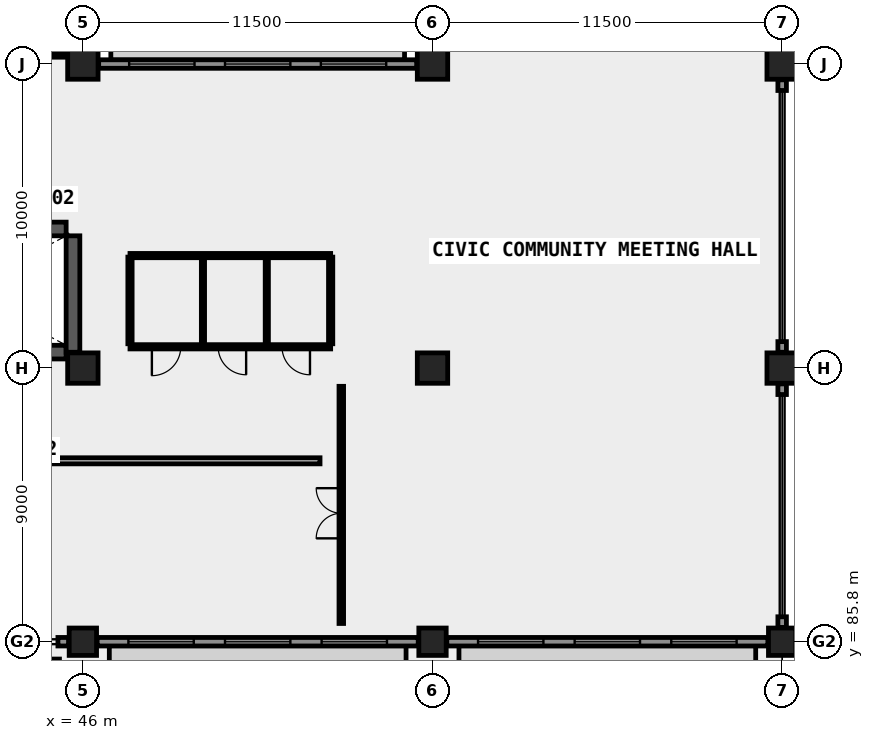
"""IFC4 building model, lengths in metres.
Left out: names, types, materials, properties, quantities, classifications, styles, units other than length and angle.
Written with IfcOpenShell. Run it as: python <this file> out.ifc"""

import sys

from ifc_helpers import new_model, si_unit, direction, frame, frame_2d, origin, origin_2d, place, context, subcontext, project, spatial, rectangle, extrude, element, fill, save


model = new_model("IFC4")
c1 = context("Model", 3, precision=1e-05, world=origin(), true_north=direction((0.0, 1.0)))
c2 = subcontext(c1, "Body", "Model", "MODEL_VIEW")
j1 = project(units=[si_unit("LENGTHUNIT", "METRE"), si_unit("PLANEANGLEUNIT", "RADIAN")], contexts=[c1])
p1 = place(None, origin())
s1 = spatial("IfcSite", under=j1, at=p1, CompositionType="ELEMENT")
p2 = place(p1, origin())
s2 = spatial("IfcBuilding", under=s1, at=p2, CompositionType="ELEMENT")
p3 = place(p2, frame((0.0, 0.0, 8.4)))
s3 = spatial("IfcBuildingStorey", under=s2, at=p3, CompositionType="ELEMENT", Elevation=8.4)
p4 = place(p3, frame((46.0, 85.8, 0.0), z_axis=(0.0, 0.0, 1.0), x_axis=(1.0, 0.0, 0.0)))
e1 = element("IfcColumn", 1, at=p4, inside=s3, PredefinedType="COLUMN", context=c2, shape_type="SweptSolid", body=[
    extrude(rectangle(XDim=0.9, YDim=0.9, at=origin_2d()), origin(), (0.0, 0.0, 1.0), 5.4),
])
for number, where, z_axis, x_axis in (
    (2, (46.0, 94.8, 0.0), (0.0, 0.0, 1.0), (1.0, 0.0, 0.0)),
    (3, (46.0, 104.8, 0.0), (0.0, 0.0, 1.0), (1.0, 0.0, 0.0)),
):
    element("IfcColumn", number, at=place(p3, frame(where, z_axis=z_axis, x_axis=x_axis)), inside=s3, PredefinedType="COLUMN", context=c2, shape_type="SweptSolid", body=[
        extrude(rectangle(XDim=1.0, YDim=1.0, at=origin_2d()), origin(), (0.0, 0.0, 1.0), 5.4),
    ])
p5 = place(p3, frame((57.5, 85.8, 0.0), z_axis=(0.0, 0.0, 1.0), x_axis=(1.0, 0.0, 0.0)))
e4 = element("IfcColumn", 4, at=p5, inside=s3, PredefinedType="COLUMN", context=c2, shape_type="SweptSolid", body=[
    extrude(rectangle(XDim=0.9, YDim=0.9, at=origin_2d()), origin(), (0.0, 0.0, 1.0), 5.4),
])
for number, where, z_axis, x_axis in (
    (5, (57.5, 94.8, 0.0), (0.0, 0.0, 1.0), (1.0, 0.0, 0.0)),
    (6, (57.5, 104.8, 0.0), (0.0, 0.0, 1.0), (1.0, 0.0, 0.0)),
):
    element("IfcColumn", number, at=place(p3, frame(where, z_axis=z_axis, x_axis=x_axis)), inside=s3, PredefinedType="COLUMN", context=c2, shape_type="SweptSolid", body=[
        extrude(rectangle(XDim=1.0, YDim=1.0, at=origin_2d()), origin(), (0.0, 0.0, 1.0), 5.4),
    ])
p6 = place(p3, frame((69.0, 85.8, 0.0), z_axis=(0.0, 0.0, 1.0), x_axis=(1.0, 0.0, 0.0)))
e7 = element("IfcColumn", 7, at=p6, inside=s3, PredefinedType="COLUMN", context=c2, shape_type="SweptSolid", body=[
    extrude(rectangle(XDim=0.9, YDim=0.9, at=origin_2d()), origin(), (0.0, 0.0, 1.0), 5.4),
])
for number, where, z_axis, x_axis in (
    (8, (69.0, 94.8, 0.0), (0.0, 0.0, 1.0), (1.0, 0.0, 0.0)),
    (9, (69.0, 104.8, 0.0), (0.0, 0.0, 1.0), (1.0, 0.0, 0.0)),
):
    element("IfcColumn", number, at=place(p3, frame(where, z_axis=z_axis, x_axis=x_axis)), inside=s3, PredefinedType="COLUMN", context=c2, shape_type="SweptSolid", body=[
        extrude(rectangle(XDim=1.0, YDim=1.0, at=origin_2d()), origin(), (0.0, 0.0, 1.0), 5.4),
    ])
p7 = place(p3, frame((36.35, 95.325, 0.0), z_axis=(0.0, 0.0, 1.0), x_axis=(1.0, 0.0, 0.0)))
e10 = element("IfcWall", 10, at=p7, inside=s3, PredefinedType="SHEAR", context=c2, shape_type="SweptSolid", body=[
    extrude(rectangle(XDim=9.1, YDim=0.45, at=frame_2d((4.55, 0.0))), origin(), (0.0, 0.0, 1.0), 5.4),
])
p8 = place(p3, frame((36.35, 99.375, 0.0), z_axis=(0.0, 0.0, 1.0), x_axis=(1.0, 0.0, 0.0)))
e11 = element("IfcWall", 11, at=p8, inside=s3, PredefinedType="SHEAR", context=c2, shape_type="SweptSolid", body=[
    extrude(rectangle(XDim=9.1, YDim=0.45, at=frame_2d((4.55, 0.0))), origin(), (0.0, 0.0, 1.0), 5.4),
])
p9 = place(p8, frame((0.55, 0.0, 0.0)))
e12 = element("IfcOpeningElement", 12, at=p9, cuts=e11, PredefinedType="OPENING", context=c2, shape_type="SweptSolid", body=[
    extrude(rectangle(XDim=1.13, YDim=2.15, at=frame_2d((0.565, 1.075))), frame((0.0, 0.235, 0.0), z_axis=(0.0, -1.0, 0.0), x_axis=(1.0, 0.0, 0.0)), (0.0, 0.0, 1.0), 0.47),
])
p10 = place(p3, frame((45.675, 95.32, 0.0), z_axis=(0.0, 0.0, 1.0), x_axis=(0.0, 1.0, 0.0)))
e13 = element("IfcWall", 13, at=p10, inside=s3, PredefinedType="SHEAR", context=c2, shape_type="SweptSolid", body=[
    extrude(rectangle(XDim=3.83, YDim=0.45, at=frame_2d((1.915, 0.0))), origin(), (0.0, 0.0, 1.0), 5.4),
])
p11 = place(p3, frame((45.18, 85.8, 0.0), z_axis=(0.0, 0.0, 1.0), x_axis=(1.0, 0.0, 0.0)))
e14 = element("IfcWall", 14, at=p11, inside=s3, PredefinedType="SOLIDWALL", context=c2, shape_type="SweptSolid", body=[
    extrude(rectangle(XDim=0.35, YDim=0.28, at=frame_2d((0.175, 0.0))), origin(), (0.0, 0.0, 1.0), 5.13),
])
p12 = place(p3, frame((46.47, 85.8, 0.0), z_axis=(0.0, 0.0, 1.0), x_axis=(1.0, 0.0, 0.0)))
e15 = element("IfcWall", 15, at=p12, inside=s3, PredefinedType="SOLIDWALL", context=c2, shape_type="SweptSolid", body=[
    extrude(rectangle(XDim=10.56, YDim=0.28, at=frame_2d((5.28, 0.0))), origin(), (0.0, 0.0, 1.0), 4.35),
])
p13 = place(p12, frame((1.028, 0.0, 0.85)))
e16 = element("IfcOpeningElement", 16, at=p13, cuts=e15, PredefinedType="OPENING", context=c2, shape_type="SweptSolid", body=[
    extrude(rectangle(XDim=2.15, YDim=1.95, at=frame_2d((1.075, 0.975))), frame((0.0, 0.15, 0.0), z_axis=(0.0, -1.0, 0.0), x_axis=(1.0, 0.0, 0.0)), (0.0, 0.0, 1.0), 0.3),
])
p14 = place(p12, frame((4.205, 0.0, 0.85)))
e17 = element("IfcOpeningElement", 17, at=p14, cuts=e15, PredefinedType="OPENING", context=c2, shape_type="SweptSolid", body=[
    extrude(rectangle(XDim=2.15, YDim=1.95, at=frame_2d((1.075, 0.975))), frame((0.0, 0.15, 0.0), z_axis=(0.0, -1.0, 0.0), x_axis=(1.0, 0.0, 0.0)), (0.0, 0.0, 1.0), 0.3),
])
p15 = place(p12, frame((7.383, 0.0, 0.85)))
e18 = element("IfcOpeningElement", 18, at=p15, cuts=e15, PredefinedType="OPENING", context=c2, shape_type="SweptSolid", body=[
    extrude(rectangle(XDim=2.15, YDim=1.95, at=frame_2d((1.075, 0.975))), frame((0.0, 0.15, 0.0), z_axis=(0.0, -1.0, 0.0), x_axis=(1.0, 0.0, 0.0)), (0.0, 0.0, 1.0), 0.3),
])
p16 = place(p3, frame((57.97, 85.8, 0.0), z_axis=(0.0, 0.0, 1.0), x_axis=(1.0, 0.0, 0.0)))
e19 = element("IfcWall", 19, at=p16, inside=s3, PredefinedType="SOLIDWALL", context=c2, shape_type="SweptSolid", body=[
    extrude(rectangle(XDim=10.56, YDim=0.28, at=frame_2d((5.28, 0.0))), origin(), (0.0, 0.0, 1.0), 4.35),
])
p17 = place(p16, frame((1.028, 0.0, 0.85)))
e20 = element("IfcOpeningElement", 20, at=p17, cuts=e19, PredefinedType="OPENING", context=c2, shape_type="SweptSolid", body=[
    extrude(rectangle(XDim=2.15, YDim=1.95, at=frame_2d((1.075, 0.975))), frame((0.0, 0.15, 0.0), z_axis=(0.0, -1.0, 0.0), x_axis=(1.0, 0.0, 0.0)), (0.0, 0.0, 1.0), 0.3),
])
p18 = place(p16, frame((4.205, 0.0, 0.85)))
e21 = element("IfcOpeningElement", 21, at=p18, cuts=e19, PredefinedType="OPENING", context=c2, shape_type="SweptSolid", body=[
    extrude(rectangle(XDim=2.15, YDim=1.95, at=frame_2d((1.075, 0.975))), frame((0.0, 0.15, 0.0), z_axis=(0.0, -1.0, 0.0), x_axis=(1.0, 0.0, 0.0)), (0.0, 0.0, 1.0), 0.3),
])
p19 = place(p16, frame((7.383, 0.0, 0.85)))
e22 = element("IfcOpeningElement", 22, at=p19, cuts=e19, PredefinedType="OPENING", context=c2, shape_type="SweptSolid", body=[
    extrude(rectangle(XDim=2.15, YDim=1.95, at=frame_2d((1.075, 0.975))), frame((0.0, 0.15, 0.0), z_axis=(0.0, -1.0, 0.0), x_axis=(1.0, 0.0, 0.0)), (0.0, 0.0, 1.0), 0.3),
])
for number, where, z_axis, x_axis in (
    (23, (69.0, 86.27, 0.0), (0.0, 0.0, 1.0), (0.0, 1.0, 0.0)),
    (24, (69.0, 93.93, 0.0), (0.0, 0.0, 1.0), (0.0, 1.0, 0.0)),
):
    element("IfcWall", number, at=place(p3, frame(where, z_axis=z_axis, x_axis=x_axis)), inside=s3, PredefinedType="SOLIDWALL", context=c2, shape_type="SweptSolid", body=[
        extrude(rectangle(XDim=0.35, YDim=0.28, at=frame_2d((0.175, 0.0))), origin(), (0.0, 0.0, 1.0), 5.13),
    ])
p20 = place(p3, frame((69.0, 95.32, 0.0), z_axis=(0.0, 0.0, 1.0), x_axis=(0.0, 1.0, 0.0)))
e25 = element("IfcWall", 25, at=p20, inside=s3, PredefinedType="SOLIDWALL", context=c2, shape_type="SweptSolid", body=[
    extrude(rectangle(XDim=0.35, YDim=0.28, at=frame_2d((0.175, 0.0))), origin(), (0.0, 0.0, 1.0), 5.13),
])
p21 = place(p3, frame((69.0, 103.93, 0.0), z_axis=(0.0, 0.0, 1.0), x_axis=(0.0, 1.0, 0.0)))
e26 = element("IfcWall", 26, at=p21, inside=s3, PredefinedType="SOLIDWALL", context=c2, shape_type="SweptSolid", body=[
    extrude(rectangle(XDim=0.35, YDim=0.28, at=frame_2d((0.175, 0.0))), origin(), (0.0, 0.0, 1.0), 5.13),
])
p22 = place(p3, frame((46.52, 104.8, 0.0), z_axis=(0.0, 0.0, 1.0), x_axis=(1.0, 0.0, 0.0)))
e27 = element("IfcWall", 27, at=p22, inside=s3, PredefinedType="SOLIDWALL", context=c2, shape_type="SweptSolid", body=[
    extrude(rectangle(XDim=10.46, YDim=0.28, at=frame_2d((5.23, 0.0))), origin(), (0.0, 0.0, 1.0), 4.35),
])
p23 = place(p22, frame((1.002, 0.0, 0.85)))
e28 = element("IfcOpeningElement", 28, at=p23, cuts=e27, PredefinedType="OPENING", context=c2, shape_type="SweptSolid", body=[
    extrude(rectangle(XDim=2.15, YDim=1.95, at=frame_2d((1.075, 0.975))), frame((0.0, 0.15, 0.0), z_axis=(0.0, -1.0, 0.0), x_axis=(1.0, 0.0, 0.0)), (0.0, 0.0, 1.0), 0.3),
])
p24 = place(p22, frame((4.155, 0.0, 0.85)))
e29 = element("IfcOpeningElement", 29, at=p24, cuts=e27, PredefinedType="OPENING", context=c2, shape_type="SweptSolid", body=[
    extrude(rectangle(XDim=2.15, YDim=1.95, at=frame_2d((1.075, 0.975))), frame((0.0, 0.15, 0.0), z_axis=(0.0, -1.0, 0.0), x_axis=(1.0, 0.0, 0.0)), (0.0, 0.0, 1.0), 0.3),
])
p25 = place(p22, frame((7.308, 0.0, 0.85)))
e30 = element("IfcOpeningElement", 30, at=p25, cuts=e27, PredefinedType="OPENING", context=c2, shape_type="SweptSolid", body=[
    extrude(rectangle(XDim=2.15, YDim=1.95, at=frame_2d((1.075, 0.975))), frame((0.0, 0.15, 0.0), z_axis=(0.0, -1.0, 0.0), x_axis=(1.0, 0.0, 0.0)), (0.0, 0.0, 1.0), 0.3),
])
p26 = place(p3, frame((47.55, 95.5, 0.0), z_axis=(0.0, 0.0, 1.0), x_axis=(1.0, 0.0, 0.0)))
e31 = element("IfcWall", 31, at=p26, inside=s3, PredefinedType="PLUMBINGWALL", context=c2, shape_type="SweptSolid", body=[
    extrude(rectangle(XDim=6.6, YDim=0.14, at=frame_2d((3.3, 0.0))), origin(), (0.0, 0.0, 1.0), 5.12),
])
p27 = place(p26, frame((0.72, 0.0, 0.0)))
e32 = element("IfcOpeningElement", 32, at=p27, cuts=e31, PredefinedType="OPENING", context=c2, shape_type="SweptSolid", body=[
    extrude(rectangle(XDim=0.95, YDim=2.1, at=frame_2d((0.475, 1.05))), frame((0.0, 0.08, 0.0), z_axis=(0.0, -1.0, 0.0), x_axis=(1.0, 0.0, 0.0)), (0.0, 0.0, 1.0), 0.16),
])
p28 = place(p26, frame((2.9, 0.0, 0.0)))
e33 = element("IfcOpeningElement", 33, at=p28, cuts=e31, PredefinedType="OPENING", context=c2, shape_type="SweptSolid", body=[
    extrude(rectangle(XDim=0.92, YDim=2.1, at=frame_2d((0.46, 1.05))), frame((0.0, 0.08, 0.0), z_axis=(0.0, -1.0, 0.0), x_axis=(1.0, 0.0, 0.0)), (0.0, 0.0, 1.0), 0.16),
])
p29 = place(p26, frame((5.0, 0.0, 0.0)))
e34 = element("IfcOpeningElement", 34, at=p29, cuts=e31, PredefinedType="OPENING", context=c2, shape_type="SweptSolid", body=[
    extrude(rectangle(XDim=0.92, YDim=2.1, at=frame_2d((0.46, 1.05))), frame((0.0, 0.08, 0.0), z_axis=(0.0, -1.0, 0.0), x_axis=(1.0, 0.0, 0.0)), (0.0, 0.0, 1.0), 0.16),
])
p30 = place(p3, frame((47.55, 95.6, 0.0), z_axis=(0.0, 0.0, 1.0), x_axis=(0.0, 1.0, 0.0)))
e35 = element("IfcWall", 35, at=p30, inside=s3, PredefinedType="PLUMBINGWALL", context=c2, shape_type="SweptSolid", body=[
    extrude(rectangle(XDim=2.85, YDim=0.14, at=frame_2d((1.425, 0.0))), origin(), (0.0, 0.0, 1.0), 5.12),
])
p31 = place(p3, frame((49.95, 95.6, 0.0), z_axis=(0.0, 0.0, 1.0), x_axis=(0.0, 1.0, 0.0)))
e36 = element("IfcWall", 36, at=p31, inside=s3, PredefinedType="PARTITIONING", context=c2, shape_type="SweptSolid", body=[
    extrude(rectangle(XDim=2.85, YDim=0.105, at=frame_2d((1.425, 0.0))), origin(), (0.0, 0.0, 1.0), 4.6),
])
p32 = place(p3, frame((52.05, 95.6, 0.0), z_axis=(0.0, 0.0, 1.0), x_axis=(0.0, 1.0, 0.0)))
e37 = element("IfcWall", 37, at=p32, inside=s3, PredefinedType="PARTITIONING", context=c2, shape_type="SweptSolid", body=[
    extrude(rectangle(XDim=2.85, YDim=0.105, at=frame_2d((1.425, 0.0))), origin(), (0.0, 0.0, 1.0), 5.12),
])
p33 = place(p3, frame((54.15, 95.6, 0.0), z_axis=(0.0, 0.0, 1.0), x_axis=(0.0, 1.0, 0.0)))
e38 = element("IfcWall", 38, at=p33, inside=s3, PredefinedType="PLUMBINGWALL", context=c2, shape_type="SweptSolid", body=[
    extrude(rectangle(XDim=2.85, YDim=0.14, at=frame_2d((1.425, 0.0))), origin(), (0.0, 0.0, 1.0), 5.12),
])
p34 = place(p3, frame((47.55, 98.5, 0.0), z_axis=(0.0, 0.0, 1.0), x_axis=(1.0, 0.0, 0.0)))
e39 = element("IfcWall", 39, at=p34, inside=s3, PredefinedType="PLUMBINGWALL", context=c2, shape_type="SweptSolid", body=[
    extrude(rectangle(XDim=6.6, YDim=0.14, at=frame_2d((3.3, 0.0))), origin(), (0.0, 0.0, 1.0), 5.12),
])
p35 = place(p3, frame((24.4, 91.75, 0.0), z_axis=(0.0, 0.0, 1.0), x_axis=(1.0, 0.0, 0.0)))
e40 = element("IfcWall", 40, at=p35, inside=s3, PredefinedType="PARTITIONING", context=c2, shape_type="SweptSolid", body=[
    extrude(rectangle(XDim=29.4, YDim=0.2, at=frame_2d((14.7, 0.0))), origin(), (0.0, 0.0, 1.0), 5.12),
])
p36 = place(p35, frame((4.2, 0.0, 0.0)))
e41 = element("IfcOpeningElement", 41, at=p36, cuts=e40, PredefinedType="OPENING", context=c2, shape_type="SweptSolid", body=[
    extrude(rectangle(XDim=1.8, YDim=2.2, at=frame_2d((0.9, 1.1))), frame((0.0, 0.11, 0.0), z_axis=(0.0, -1.0, 0.0), x_axis=(1.0, 0.0, 0.0)), (0.0, 0.0, 1.0), 0.22),
])
p37 = place(p35, frame((16.5, 0.0, 0.0)))
e42 = element("IfcOpeningElement", 42, at=p37, cuts=e40, PredefinedType="OPENING", context=c2, shape_type="SweptSolid", body=[
    extrude(rectangle(XDim=0.98, YDim=2.15, at=frame_2d((0.49, 1.075))), frame((0.0, 0.11, 0.0), z_axis=(0.0, -1.0, 0.0), x_axis=(1.0, 0.0, 0.0)), (0.0, 0.0, 1.0), 0.22),
])
p38 = place(p3, frame((54.5, 86.4, 0.0), z_axis=(0.0, 0.0, 1.0), x_axis=(0.0, 1.0, 0.0)))
e43 = element("IfcWall", 43, at=p38, inside=s3, PredefinedType="PARTITIONING", context=c2, shape_type="SweptSolid", body=[
    extrude(rectangle(XDim=7.8, YDim=0.15, at=frame_2d((3.9, 0.0))), origin(), (0.0, 0.0, 1.0), 5.12),
])
p39 = place(p38, frame((2.8, 0.0, 0.0)))
e44 = element("IfcOpeningElement", 44, at=p39, cuts=e43, PredefinedType="OPENING", context=c2, shape_type="SweptSolid", body=[
    extrude(rectangle(XDim=1.65, YDim=2.2, at=frame_2d((0.825, 1.1))), frame((0.0, 0.085, 0.0), z_axis=(0.0, -1.0, 0.0), x_axis=(1.0, 0.0, 0.0)), (0.0, 0.0, 1.0), 0.17),
])
p40 = place(p3, frame((23.6, 105.1, 0.0), z_axis=(0.0, 0.0, 1.0), x_axis=(1.0, 0.0, 0.0)))
e45 = element("IfcWall", 45, at=p40, inside=s3, PredefinedType="PARTITIONING", context=c2, shape_type="SweptSolid", body=[
    extrude(rectangle(XDim=21.8, YDim=0.15, at=frame_2d((10.9, 0.0))), origin(), (0.0, 0.0, 1.0), 5.12),
])
p41 = place(p40, frame((14.5, 0.0, 0.0)))
e46 = element("IfcOpeningElement", 46, at=p41, cuts=e45, PredefinedType="OPENING", context=c2, shape_type="SweptSolid", body=[
    extrude(rectangle(XDim=1.85, YDim=2.25, at=frame_2d((0.925, 1.125))), frame((0.0, 0.085, 0.0), z_axis=(0.0, -1.0, 0.0), x_axis=(1.0, 0.0, 0.0)), (0.0, 0.0, 1.0), 0.17),
])
p42 = place(p13, origin())
e47 = element("IfcWindow", 47, at=p42, inside=s3, PartitioningType="SINGLE_PANEL", PredefinedType="WINDOW", context=c2, shape_type="SweptSolid", body=[
    extrude(rectangle(XDim=2.15, YDim=1.95, at=frame_2d((1.075, 0.975))), frame((0.0, 0.03, 0.0), z_axis=(0.0, -1.0, 0.0), x_axis=(1.0, 0.0, 0.0)), (0.0, 0.0, 1.0), 0.06),
])
fill(e16, e47)
p43 = place(p14, origin())
e48 = element("IfcWindow", 48, at=p43, inside=s3, PartitioningType="SINGLE_PANEL", PredefinedType="WINDOW", context=c2, shape_type="SweptSolid", body=[
    extrude(rectangle(XDim=2.15, YDim=1.95, at=frame_2d((1.075, 0.975))), frame((0.0, 0.03, 0.0), z_axis=(0.0, -1.0, 0.0), x_axis=(1.0, 0.0, 0.0)), (0.0, 0.0, 1.0), 0.06),
])
fill(e17, e48)
p44 = place(p15, origin())
e49 = element("IfcWindow", 49, at=p44, inside=s3, PartitioningType="SINGLE_PANEL", PredefinedType="WINDOW", context=c2, shape_type="SweptSolid", body=[
    extrude(rectangle(XDim=2.15, YDim=1.95, at=frame_2d((1.075, 0.975))), frame((0.0, 0.03, 0.0), z_axis=(0.0, -1.0, 0.0), x_axis=(1.0, 0.0, 0.0)), (0.0, 0.0, 1.0), 0.06),
])
fill(e18, e49)
p45 = place(p17, origin())
e50 = element("IfcWindow", 50, at=p45, inside=s3, PartitioningType="SINGLE_PANEL", PredefinedType="WINDOW", context=c2, shape_type="SweptSolid", body=[
    extrude(rectangle(XDim=2.15, YDim=1.95, at=frame_2d((1.075, 0.975))), frame((0.0, 0.03, 0.0), z_axis=(0.0, -1.0, 0.0), x_axis=(1.0, 0.0, 0.0)), (0.0, 0.0, 1.0), 0.06),
])
fill(e20, e50)
p46 = place(p18, origin())
e51 = element("IfcWindow", 51, at=p46, inside=s3, PartitioningType="SINGLE_PANEL", PredefinedType="WINDOW", context=c2, shape_type="SweptSolid", body=[
    extrude(rectangle(XDim=2.15, YDim=1.95, at=frame_2d((1.075, 0.975))), frame((0.0, 0.03, 0.0), z_axis=(0.0, -1.0, 0.0), x_axis=(1.0, 0.0, 0.0)), (0.0, 0.0, 1.0), 0.06),
])
fill(e21, e51)
p47 = place(p19, origin())
e52 = element("IfcWindow", 52, at=p47, inside=s3, PartitioningType="SINGLE_PANEL", PredefinedType="WINDOW", context=c2, shape_type="SweptSolid", body=[
    extrude(rectangle(XDim=2.15, YDim=1.95, at=frame_2d((1.075, 0.975))), frame((0.0, 0.03, 0.0), z_axis=(0.0, -1.0, 0.0), x_axis=(1.0, 0.0, 0.0)), (0.0, 0.0, 1.0), 0.06),
])
fill(e22, e52)
p48 = place(p23, origin())
e53 = element("IfcWindow", 53, at=p48, inside=s3, PartitioningType="SINGLE_PANEL", PredefinedType="WINDOW", context=c2, shape_type="SweptSolid", body=[
    extrude(rectangle(XDim=2.15, YDim=1.95, at=frame_2d((1.075, 0.975))), frame((0.0, 0.03, 0.0), z_axis=(0.0, -1.0, 0.0), x_axis=(1.0, 0.0, 0.0)), (0.0, 0.0, 1.0), 0.06),
])
fill(e28, e53)
p49 = place(p24, origin())
e54 = element("IfcWindow", 54, at=p49, inside=s3, PartitioningType="SINGLE_PANEL", PredefinedType="WINDOW", context=c2, shape_type="SweptSolid", body=[
    extrude(rectangle(XDim=2.15, YDim=1.95, at=frame_2d((1.075, 0.975))), frame((0.0, 0.03, 0.0), z_axis=(0.0, -1.0, 0.0), x_axis=(1.0, 0.0, 0.0)), (0.0, 0.0, 1.0), 0.06),
])
fill(e29, e54)
p50 = place(p25, origin())
e55 = element("IfcWindow", 55, at=p50, inside=s3, PartitioningType="SINGLE_PANEL", PredefinedType="WINDOW", context=c2, shape_type="SweptSolid", body=[
    extrude(rectangle(XDim=2.15, YDim=1.95, at=frame_2d((1.075, 0.975))), frame((0.0, 0.03, 0.0), z_axis=(0.0, -1.0, 0.0), x_axis=(1.0, 0.0, 0.0)), (0.0, 0.0, 1.0), 0.06),
])
fill(e30, e55)
p51 = place(p27, frame((0.475, 0.0, 0.0), z_axis=(0.0, 0.0, 1.0), x_axis=(-1.0, 0.0, 0.0)))
e56 = element("IfcDoor", 56, at=p51, inside=s3, OperationType="SINGLE_SWING_LEFT", PredefinedType="DOOR", context=c2, shape_type="SweptSolid", body=[
    extrude(rectangle(XDim=0.95, YDim=2.1, at=frame_2d((0.0, 1.05))), frame((0.0, 0.025, 0.0), z_axis=(0.0, -1.0, 0.0), x_axis=(1.0, 0.0, 0.0)), (0.0, 0.0, 1.0), 0.05),
])
fill(e32, e56)
p52 = place(p28, origin())
e57 = element("IfcDoor", 57, at=p52, inside=s3, OperationType="SINGLE_SWING_RIGHT", PredefinedType="DOOR", context=c2, shape_type="SweptSolid", body=[
    extrude(rectangle(XDim=0.92, YDim=2.1, at=frame_2d((0.46, 1.05))), frame((0.0, 0.025, 0.0), z_axis=(0.0, -1.0, 0.0), x_axis=(1.0, 0.0, 0.0)), (0.0, 0.0, 1.0), 0.05),
])
fill(e33, e57)
p53 = place(p29, origin())
e58 = element("IfcDoor", 58, at=p53, inside=s3, OperationType="SINGLE_SWING_RIGHT", PredefinedType="DOOR", context=c2, shape_type="SweptSolid", body=[
    extrude(rectangle(XDim=0.92, YDim=2.1, at=frame_2d((0.46, 1.05))), frame((0.0, 0.025, 0.0), z_axis=(0.0, -1.0, 0.0), x_axis=(1.0, 0.0, 0.0)), (0.0, 0.0, 1.0), 0.05),
])
fill(e34, e58)
p54 = place(p39, origin())
e59 = element("IfcDoor", 59, at=p54, inside=s3, OperationType="DOUBLE_DOOR_SINGLE_SWING", PredefinedType="DOOR", context=c2, shape_type="SweptSolid", body=[
    extrude(rectangle(XDim=1.65, YDim=2.2, at=frame_2d((0.825, 1.1))), frame((0.0, 0.025, 0.0), z_axis=(0.0, -1.0, 0.0), x_axis=(1.0, 0.0, 0.0)), (0.0, 0.0, 1.0), 0.05),
])
fill(e44, e59)
save(model, sys.argv[1])
